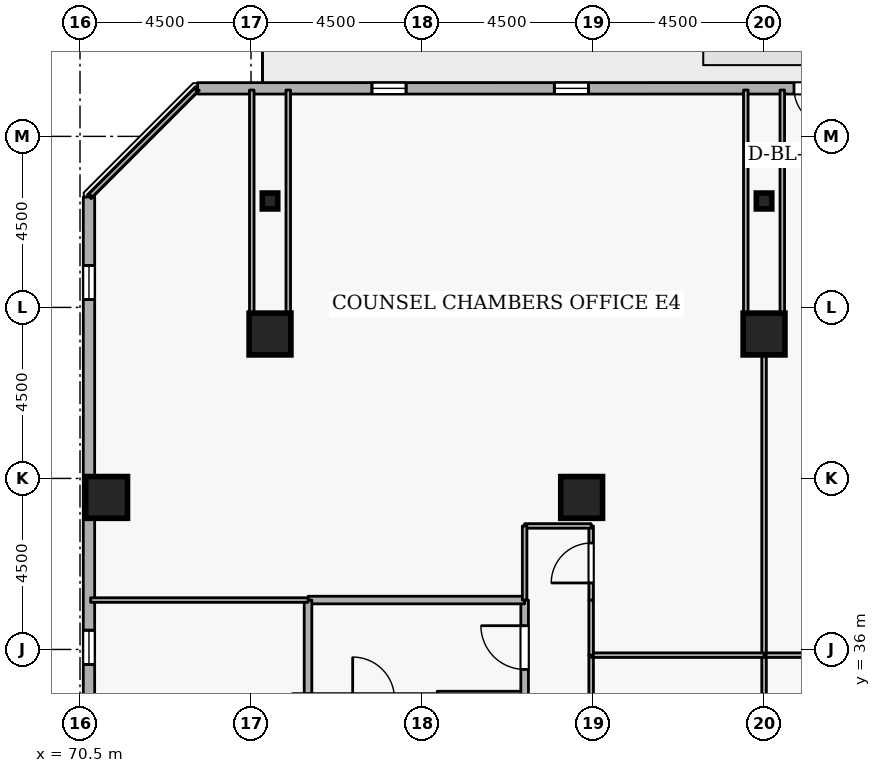
"""IFC4 building model, lengths in metres.
Left out: names, types, materials, properties, quantities, classifications, styles, units other than length and angle.
Written with IfcOpenShell. Run it as: python <this file> out.ifc"""

import sys

from ifc_helpers import new_model, si_unit, direction, frame, frame_2d, origin, origin_2d, place, context, subcontext, project, spatial, rectangle, i_section, extrude, element, fill, save


model = new_model("IFC4")
c1 = context("Model", 3, precision=1e-05, world=origin(), true_north=direction((0.0, 1.0)))
c2 = subcontext(c1, "Body", "Model", "MODEL_VIEW")
j1 = project(units=[si_unit("LENGTHUNIT", "METRE"), si_unit("PLANEANGLEUNIT", "RADIAN")], contexts=[c1])
p1 = place(None, origin())
s1 = spatial("IfcSite", under=j1, at=p1, CompositionType="ELEMENT")
p2 = place(p1, origin())
s2 = spatial("IfcBuilding", under=s1, at=p2, CompositionType="ELEMENT")
p3 = place(p2, frame((0.0, 0.0, 167.1)))
s3 = spatial("IfcBuildingStorey", under=s2, at=p3, CompositionType="ELEMENT", Elevation=167.1)
for number, where, z_axis, x_axis in (
    (1, (88.5, 44.3, 0.0), (0.0, 0.0, 1.0), (1.0, 0.0, 0.0)),
    (2, (75.5, 44.3, 0.0), (0.0, 0.0, 1.0), (1.0, 0.0, 0.0)),
    (3, (71.2, 40.0, 0.0), (0.0, 0.0, 1.0), (1.0, 0.0, 0.0)),
    (4, (83.7, 40.0, 0.0), (0.0, 0.0, 1.0), (1.0, 0.0, 0.0)),
):
    element("IfcColumn", number, at=place(p3, frame(where, z_axis=z_axis, x_axis=x_axis)), inside=s3, PredefinedType="COLUMN", context=c2, shape_type="SweptSolid", body=[
        extrude(rectangle(XDim=1.1, YDim=1.1, at=origin_2d()), origin(), (0.0, 0.0, 1.0), 3.6),
    ])
for number, where, z_axis, x_axis in (
    (5, (88.5, 47.8, 0.0), (0.0, 0.0, 1.0), (1.0, 0.0, 0.0)),
    (6, (75.5, 47.8, 0.0), (0.0, 0.0, 1.0), (1.0, 0.0, 0.0)),
):
    element("IfcColumn", number, at=place(p3, frame(where, z_axis=z_axis, x_axis=x_axis)), inside=s3, PredefinedType="COLUMN", context=c2, shape_type="SweptSolid", body=[
        extrude(i_section(OverallWidth=0.407, OverallDepth=0.419, WebThickness=0.031, FlangeThickness=0.049, FilletRadius=0.015, at=origin_2d()), origin(), (0.0, 0.0, 1.0), 3.6),
    ])
p4 = place(p3, frame((109.681, 50.765, 0.0), z_axis=(0.0, 0.0, 1.0), x_axis=(-0.999999999634, -2.7061402e-05, 0.0)))
e7 = element("IfcWall", 7, at=p4, inside=s3, PredefinedType="STANDARD", context=c2, shape_type="SweptSolid", body=[
    extrude(rectangle(XDim=36.087, YDim=0.3, at=frame_2d((18.043, 0.0))), origin(), (0.0, 0.0, 1.0), 2.7),
])
p5 = place(p4, frame((19.393, 0.0, 0.0)))
e8 = element("IfcOpeningElement", 8, at=p5, cuts=e7, PredefinedType="OPENING", context=c2, shape_type="SweptSolid", body=[
    extrude(rectangle(XDim=1.0, YDim=2.08, at=frame_2d((0.5, 1.04))), frame((0.0, 0.16, 0.0), z_axis=(0.0, -1.0, 0.0), x_axis=(1.0, 0.0, 0.0)), (0.0, 0.0, 1.0), 0.32),
])
p6 = place(p4, frame((1.8, 0.0, 0.72)))
e9 = element("IfcOpeningElement", 9, at=p6, cuts=e7, PredefinedType="OPENING", context=c2, shape_type="SweptSolid", body=[
    extrude(rectangle(XDim=0.9, YDim=1.75, at=frame_2d((0.45, 0.875))), frame((0.0, 0.16, 0.0), z_axis=(0.0, -1.0, 0.0), x_axis=(1.0, 0.0, 0.0)), (0.0, 0.0, 1.0), 0.32),
])
p7 = place(p4, frame((11.4, 0.0, 0.72)))
e10 = element("IfcOpeningElement", 10, at=p7, cuts=e7, PredefinedType="OPENING", context=c2, shape_type="SweptSolid", body=[
    extrude(rectangle(XDim=0.9, YDim=1.75, at=frame_2d((0.45, 0.875))), frame((0.0, 0.16, 0.0), z_axis=(0.0, -1.0, 0.0), x_axis=(1.0, 0.0, 0.0)), (0.0, 0.0, 1.0), 0.32),
])
p8 = place(p4, frame((16.2, 0.0, 0.72)))
e11 = element("IfcOpeningElement", 11, at=p8, cuts=e7, PredefinedType="OPENING", context=c2, shape_type="SweptSolid", body=[
    extrude(rectangle(XDim=0.9, YDim=1.75, at=frame_2d((0.45, 0.875))), frame((0.0, 0.16, 0.0), z_axis=(0.0, -1.0, 0.0), x_axis=(1.0, 0.0, 0.0)), (0.0, 0.0, 1.0), 0.32),
])
p9 = place(p4, frame((25.8, 0.0, 0.72)))
e12 = element("IfcOpeningElement", 12, at=p9, cuts=e7, PredefinedType="OPENING", context=c2, shape_type="SweptSolid", body=[
    extrude(rectangle(XDim=0.9, YDim=1.75, at=frame_2d((0.45, 0.875))), frame((0.0, 0.16, 0.0), z_axis=(0.0, -1.0, 0.0), x_axis=(1.0, 0.0, 0.0)), (0.0, 0.0, 1.0), 0.32),
])
p10 = place(p4, frame((30.6, 0.0, 0.72)))
e13 = element("IfcOpeningElement", 13, at=p10, cuts=e7, PredefinedType="OPENING", context=c2, shape_type="SweptSolid", body=[
    extrude(rectangle(XDim=0.9, YDim=1.75, at=frame_2d((0.45, 0.875))), frame((0.0, 0.16, 0.0), z_axis=(0.0, -1.0, 0.0), x_axis=(1.0, 0.0, 0.0)), (0.0, 0.0, 1.0), 0.32),
])
p11 = place(p3, frame((70.736, 47.906, 0.0), z_axis=(0.0, 0.0, 1.0), x_axis=(-2.7061402e-05, -0.999999999634, 0.0)))
e14 = element("IfcWall", 14, at=p11, inside=s3, PredefinedType="STANDARD", context=c2, shape_type="SweptSolid", body=[
    extrude(rectangle(XDim=36.087, YDim=0.3, at=frame_2d((18.043, 0.0))), origin(), (0.0, 0.0, 1.0), 2.7),
])
p12 = place(p11, frame((1.8, 0.0, 0.72)))
e15 = element("IfcOpeningElement", 15, at=p12, cuts=e14, PredefinedType="OPENING", context=c2, shape_type="SweptSolid", body=[
    extrude(rectangle(XDim=0.9, YDim=1.75, at=frame_2d((0.45, 0.875))), frame((0.0, 0.16, 0.0), z_axis=(0.0, -1.0, 0.0), x_axis=(1.0, 0.0, 0.0)), (0.0, 0.0, 1.0), 0.32),
])
p13 = place(p11, frame((11.4, 0.0, 0.72)))
e16 = element("IfcOpeningElement", 16, at=p13, cuts=e14, PredefinedType="OPENING", context=c2, shape_type="SweptSolid", body=[
    extrude(rectangle(XDim=0.9, YDim=1.75, at=frame_2d((0.45, 0.875))), frame((0.0, 0.16, 0.0), z_axis=(0.0, -1.0, 0.0), x_axis=(1.0, 0.0, 0.0)), (0.0, 0.0, 1.0), 0.32),
])
p14 = place(p11, frame((16.2, 0.0, 0.72)))
e17 = element("IfcOpeningElement", 17, at=p14, cuts=e14, PredefinedType="OPENING", context=c2, shape_type="SweptSolid", body=[
    extrude(rectangle(XDim=0.9, YDim=1.75, at=frame_2d((0.45, 0.875))), frame((0.0, 0.16, 0.0), z_axis=(0.0, -1.0, 0.0), x_axis=(1.0, 0.0, 0.0)), (0.0, 0.0, 1.0), 0.32),
])
p15 = place(p11, frame((25.8, 0.0, 0.72)))
e18 = element("IfcOpeningElement", 18, at=p15, cuts=e14, PredefinedType="OPENING", context=c2, shape_type="SweptSolid", body=[
    extrude(rectangle(XDim=0.9, YDim=1.75, at=frame_2d((0.45, 0.875))), frame((0.0, 0.16, 0.0), z_axis=(0.0, -1.0, 0.0), x_axis=(1.0, 0.0, 0.0)), (0.0, 0.0, 1.0), 0.32),
])
p16 = place(p11, frame((30.6, 0.0, 0.72)))
e19 = element("IfcOpeningElement", 19, at=p16, cuts=e14, PredefinedType="OPENING", context=c2, shape_type="SweptSolid", body=[
    extrude(rectangle(XDim=0.9, YDim=1.75, at=frame_2d((0.45, 0.875))), frame((0.0, 0.16, 0.0), z_axis=(0.0, -1.0, 0.0), x_axis=(1.0, 0.0, 0.0)), (0.0, 0.0, 1.0), 0.32),
])
p17 = place(p3, frame((79.9, 34.8, 0.0), z_axis=(0.0, 0.0, 1.0), x_axis=(1.0, 0.0, 0.0)))
e20 = element("IfcWall", 20, at=p17, inside=s3, PredefinedType="STANDARD", context=c2, shape_type="SweptSolid", body=[
    extrude(rectangle(XDim=2.3, YDim=0.2, at=frame_2d((1.15, 0.0))), origin(), (0.0, 0.0, 1.0), 2.545),
])
p18 = place(p3, frame((82.2, 34.8, 0.0), z_axis=(0.0, 0.0, 1.0), x_axis=(0.0, 1.0, 0.0)))
e21 = element("IfcWall", 21, at=p18, inside=s3, PredefinedType="STANDARD", context=c2, shape_type="SweptSolid", body=[
    extrude(rectangle(XDim=2.5, YDim=0.2, at=frame_2d((1.25, 0.0))), origin(), (0.0, 0.0, 1.0), 3.34),
])
p19 = place(p18, frame((0.675, 0.0, 0.0)))
e22 = element("IfcOpeningElement", 22, at=p19, cuts=e21, PredefinedType="OPENING", context=c2, shape_type="SweptSolid", body=[
    extrude(rectangle(XDim=1.15, YDim=2.1, at=frame_2d((0.575, 1.05))), frame((0.0, 0.11, 0.0), z_axis=(0.0, -1.0, 0.0), x_axis=(1.0, 0.0, 0.0)), (0.0, 0.0, 1.0), 0.22),
])
p20 = place(p3, frame((82.2, 37.3, 0.0), z_axis=(0.0, 0.0, 1.0), x_axis=(-1.0, 0.0, 0.0)))
e23 = element("IfcWall", 23, at=p20, inside=s3, PredefinedType="STANDARD", context=c2, shape_type="SweptSolid", body=[
    extrude(rectangle(XDim=5.7, YDim=0.2, at=frame_2d((2.85, 0.0))), origin(), (0.0, 0.0, 1.0), 3.34),
])
p21 = place(p3, frame((76.5, 37.3, 0.0), z_axis=(0.0, 0.0, 1.0), x_axis=(0.0, -1.0, 0.0)))
e24 = element("IfcWall", 24, at=p21, inside=s3, PredefinedType="STANDARD", context=c2, shape_type="SweptSolid", body=[
    extrude(rectangle(XDim=2.5, YDim=0.2, at=frame_2d((1.25, 0.0))), origin(), (0.0, 0.0, 1.0), 3.34),
])
p22 = place(p3, frame((88.5, 33.95, 0.0), z_axis=(0.0, 0.0, 1.0), x_axis=(0.0, 1.0, 0.0)))
e25 = element("IfcWall", 25, at=p22, inside=s3, PredefinedType="PARTITIONING", context=c2, shape_type="SweptSolid", body=[
    extrude(rectangle(XDim=1.9, YDim=0.12, at=frame_2d((0.95, 0.0))), origin(), (0.0, 0.0, 1.0), 3.34),
])
p23 = place(p3, frame((88.5, 35.85, 0.0), z_axis=(0.0, 0.0, 1.0), x_axis=(1.0, 0.0, 0.0)))
e26 = element("IfcWall", 26, at=p23, inside=s3, PredefinedType="PARTITIONING", context=c2, shape_type="SweptSolid", body=[
    extrude(rectangle(XDim=4.55, YDim=0.12, at=frame_2d((2.275, 0.0))), origin(), (0.0, 0.0, 1.0), 3.34),
])
p24 = place(p3, frame((88.5, 35.85, 0.0), z_axis=(0.0, 0.0, 1.0), x_axis=(0.0, 1.0, 0.0)))
e27 = element("IfcWall", 27, at=p24, inside=s3, PredefinedType="PARTITIONING", context=c2, shape_type="SweptSolid", body=[
    extrude(rectangle(XDim=8.45, YDim=0.12, at=frame_2d((4.225, 0.0))), origin(), (0.0, 0.0, 1.0), 2.882),
])
p25 = place(p3, frame((88.98, 44.3, 0.0), z_axis=(0.0, 0.0, 1.0), x_axis=(0.0, 1.0, 0.0)))
e28 = element("IfcWall", 28, at=p25, inside=s3, PredefinedType="PARTITIONING", context=c2, shape_type="SweptSolid", body=[
    extrude(rectangle(XDim=6.42, YDim=0.12, at=frame_2d((3.21, 0.0))), origin(), (0.0, 0.0, 1.0), 3.34),
])
p26 = place(p3, frame((83.95, 33.95, 0.0), z_axis=(0.0, 0.0, 1.0), x_axis=(0.0, 1.0, 0.0)))
e29 = element("IfcWall", 29, at=p26, inside=s3, PredefinedType="PARTITIONING", context=c2, shape_type="SweptSolid", body=[
    extrude(rectangle(XDim=1.9, YDim=0.12, at=frame_2d((0.95, 0.0))), origin(), (0.0, 0.0, 1.0), 3.34),
])
p27 = place(p3, frame((83.95, 35.85, 0.0), z_axis=(0.0, 0.0, 1.0), x_axis=(1.0, 0.0, 0.0)))
e30 = element("IfcWall", 30, at=p27, inside=s3, PredefinedType="PARTITIONING", context=c2, shape_type="SweptSolid", body=[
    extrude(rectangle(XDim=4.55, YDim=0.12, at=frame_2d((2.275, 0.0))), origin(), (0.0, 0.0, 1.0), 3.34),
])
p28 = place(p3, frame((83.95, 35.85, 0.0), z_axis=(0.0, 0.0, 1.0), x_axis=(0.0, 1.0, 0.0)))
e31 = element("IfcWall", 31, at=p28, inside=s3, PredefinedType="PARTITIONING", context=c2, shape_type="SweptSolid", body=[
    extrude(rectangle(XDim=1.45, YDim=0.12, at=frame_2d((0.725, 0.0))), origin(), (0.0, 0.0, 1.0), 3.34),
])
p29 = place(p3, frame((83.95, 37.3, 0.0), z_axis=(0.0, 0.0, 1.0), x_axis=(0.0, 1.0, 0.0)))
e32 = element("IfcWall", 32, at=p29, inside=s3, PredefinedType="PARTITIONING", context=c2, shape_type="SweptSolid", body=[
    extrude(rectangle(XDim=1.95, YDim=0.12, at=frame_2d((0.975, 0.0))), origin(), (0.0, 0.0, 1.0), 3.34),
])
p30 = place(p29, frame((0.45, 0.0, 0.0)))
e33 = element("IfcOpeningElement", 33, at=p30, cuts=e32, PredefinedType="OPENING", context=c2, shape_type="SweptSolid", body=[
    extrude(rectangle(XDim=1.05, YDim=2.1, at=frame_2d((0.525, 1.05))), frame((0.0, 0.07, 0.0), z_axis=(0.0, -1.0, 0.0), x_axis=(1.0, 0.0, 0.0)), (0.0, 0.0, 1.0), 0.14),
])
p31 = place(p3, frame((83.95, 39.25, 0.0), z_axis=(0.0, 0.0, 1.0), x_axis=(-1.0, 0.0, 0.0)))
e34 = element("IfcWall", 34, at=p31, inside=s3, PredefinedType="PARTITIONING", context=c2, shape_type="SweptSolid", body=[
    extrude(rectangle(XDim=1.75, YDim=0.12, at=frame_2d((0.875, 0.0))), origin(), (0.0, 0.0, 1.0), 3.34),
])
p32 = place(p3, frame((82.2, 39.25, 0.0), z_axis=(0.0, 0.0, 1.0), x_axis=(0.0, -1.0, 0.0)))
e35 = element("IfcWall", 35, at=p32, inside=s3, PredefinedType="PARTITIONING", context=c2, shape_type="SweptSolid", body=[
    extrude(rectangle(XDim=1.95, YDim=0.12, at=frame_2d((0.975, 0.0))), origin(), (0.0, 0.0, 1.0), 3.34),
])
p33 = place(p3, frame((76.5, 37.3, 0.0), z_axis=(0.0, 0.0, 1.0), x_axis=(-1.0, 0.0, 0.0)))
e36 = element("IfcWall", 36, at=p33, inside=s3, PredefinedType="PARTITIONING", context=c2, shape_type="SweptSolid", body=[
    extrude(rectangle(XDim=5.72, YDim=0.12, at=frame_2d((2.86, 0.0))), origin(), (0.0, 0.0, 1.0), 3.34),
])
p34 = place(p3, frame((70.78, 47.948, 0.0), z_axis=(0.0, 0.0, 1.0), x_axis=(0.707106781187, 0.707106781187, 0.0)))
e37 = element("IfcWall", 37, at=p34, inside=s3, PredefinedType="PARTITIONING", context=c2, shape_type="SweptSolid", body=[
    extrude(rectangle(XDim=3.919, YDim=0.12, at=frame_2d((1.96, 0.0))), origin(), (0.0, 0.0, 1.0), 3.34),
])
p35 = place(p3, frame((75.02, 50.72, 0.0), z_axis=(0.0, 0.0, 1.0), x_axis=(0.0, -1.0, 0.0)))
e38 = element("IfcWall", 38, at=p35, inside=s3, PredefinedType="PARTITIONING", context=c2, shape_type="SweptSolid", body=[
    extrude(rectangle(XDim=6.42, YDim=0.12, at=frame_2d((3.21, 0.0))), origin(), (0.0, 0.0, 1.0), 2.895),
])
for number, where, z_axis, x_axis in (
    (39, (75.98, 44.3, 0.0), (0.0, 0.0, 1.0), (0.0, 1.0, 0.0)),
    (40, (88.02, 50.72, 0.0), (0.0, 0.0, 1.0), (0.0, -1.0, 0.0)),
):
    element("IfcWall", number, at=place(p3, frame(where, z_axis=z_axis, x_axis=x_axis)), inside=s3, PredefinedType="PARTITIONING", context=c2, shape_type="SweptSolid", body=[
        extrude(rectangle(XDim=6.42, YDim=0.12, at=frame_2d((3.21, 0.0))), origin(), (0.0, 0.0, 1.0), 3.34),
    ])
p36 = place(p5, origin())
e41 = element("IfcDoor", 41, at=p36, inside=s3, OperationType="SINGLE_SWING_LEFT", PredefinedType="DOOR", context=c2, shape_type="SweptSolid", body=[
    extrude(rectangle(XDim=1.0, YDim=2.08, at=frame_2d((0.5, 1.04))), frame((0.0, 0.025, 0.0), z_axis=(0.0, -1.0, 0.0), x_axis=(1.0, 0.0, 0.0)), (0.0, 0.0, 1.0), 0.05),
])
fill(e8, e41)
p37 = place(p9, origin())
e42 = element("IfcWindow", 42, at=p37, inside=s3, PartitioningType="SINGLE_PANEL", PredefinedType="WINDOW", context=c2, shape_type="SweptSolid", body=[
    extrude(rectangle(XDim=0.9, YDim=1.75, at=frame_2d((0.45, 0.875))), frame((0.0, 0.03, 0.0), z_axis=(0.0, -1.0, 0.0), x_axis=(1.0, 0.0, 0.0)), (0.0, 0.0, 1.0), 0.06),
])
fill(e12, e42)
p38 = place(p10, origin())
e43 = element("IfcWindow", 43, at=p38, inside=s3, PartitioningType="SINGLE_PANEL", PredefinedType="WINDOW", context=c2, shape_type="SweptSolid", body=[
    extrude(rectangle(XDim=0.9, YDim=1.75, at=frame_2d((0.45, 0.875))), frame((0.0, 0.03, 0.0), z_axis=(0.0, -1.0, 0.0), x_axis=(1.0, 0.0, 0.0)), (0.0, 0.0, 1.0), 0.06),
])
fill(e13, e43)
p39 = place(p12, origin())
e44 = element("IfcWindow", 44, at=p39, inside=s3, PartitioningType="SINGLE_PANEL", PredefinedType="WINDOW", context=c2, shape_type="SweptSolid", body=[
    extrude(rectangle(XDim=0.9, YDim=1.75, at=frame_2d((0.45, 0.875))), frame((0.0, 0.03, 0.0), z_axis=(0.0, -1.0, 0.0), x_axis=(1.0, 0.0, 0.0)), (0.0, 0.0, 1.0), 0.06),
])
fill(e15, e44)
p40 = place(p13, origin())
e45 = element("IfcWindow", 45, at=p40, inside=s3, PartitioningType="SINGLE_PANEL", PredefinedType="WINDOW", context=c2, shape_type="SweptSolid", body=[
    extrude(rectangle(XDim=0.9, YDim=1.75, at=frame_2d((0.45, 0.875))), frame((0.0, 0.03, 0.0), z_axis=(0.0, -1.0, 0.0), x_axis=(1.0, 0.0, 0.0)), (0.0, 0.0, 1.0), 0.06),
])
fill(e16, e45)
p41 = place(p19, origin())
e46 = element("IfcDoor", 46, at=p41, inside=s3, OperationType="SINGLE_SWING_RIGHT", PredefinedType="DOOR", context=c2, shape_type="SweptSolid", body=[
    extrude(rectangle(XDim=1.15, YDim=2.1, at=frame_2d((0.575, 1.05))), frame((0.0, 0.025, 0.0), z_axis=(0.0, -1.0, 0.0), x_axis=(1.0, 0.0, 0.0)), (0.0, 0.0, 1.0), 0.05),
])
fill(e22, e46)
p42 = place(p30, origin())
e47 = element("IfcDoor", 47, at=p42, inside=s3, OperationType="SINGLE_SWING_LEFT", PredefinedType="DOOR", context=c2, shape_type="SweptSolid", body=[
    extrude(rectangle(XDim=1.05, YDim=2.1, at=frame_2d((0.525, 1.05))), frame((0.0, 0.025, 0.0), z_axis=(0.0, -1.0, 0.0), x_axis=(1.0, 0.0, 0.0)), (0.0, 0.0, 1.0), 0.05),
])
fill(e33, e47)
save(model, sys.argv[1])
